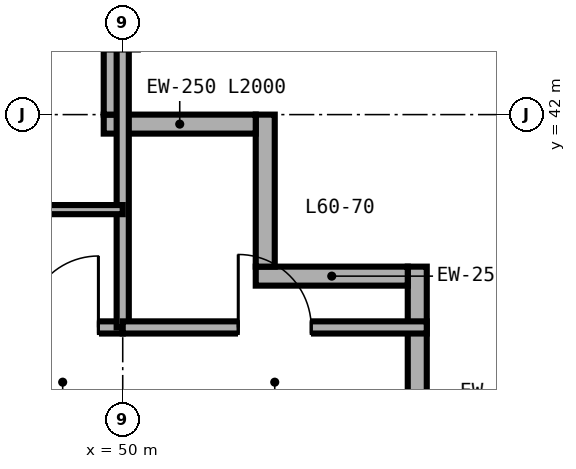
"""IFC4 building model, lengths in metres.
Left out: names, types, materials, properties, quantities, classifications, styles, units other than length and angle.
Written with IfcOpenShell. Run it as: python <this file> out.ifc"""

import sys

from ifc_helpers import new_model, si_unit, direction, frame, frame_2d, origin, place, context, subcontext, project, spatial, rectangle, extrude, source, transform, mapped, element, fill, save


model = new_model("IFC4")
c1 = context("Model", 3, precision=1e-05, world=origin(), true_north=direction((0.0, 1.0)))
c2 = subcontext(c1, "Body", "Model", "MODEL_VIEW")
j1 = project(units=[si_unit("LENGTHUNIT", "METRE"), si_unit("PLANEANGLEUNIT", "RADIAN")], contexts=[c1])
p1 = place(None, origin())
s1 = spatial("IfcSite", under=j1, at=p1, CompositionType="ELEMENT")
p2 = place(p1, origin())
s2 = spatial("IfcBuilding", under=s1, at=p2, CompositionType="ELEMENT")
p3 = place(p2, frame((0.0, 0.0, 240.0)))
s3 = spatial("IfcBuildingStorey", under=s2, at=p3, CompositionType="ELEMENT", Elevation=240.0)
for number, where, z_axis, x_axis in (
    (1, (53.875, 38.0, 0.0), (0.0, 0.0, 1.0), (0.0, 1.0, 0.0)),
    (2, (53.75, 39.875, 0.0), (0.0, 0.0, 1.0), (-1.0, 0.0, 0.0)),
    (3, (51.875, 40.0, 0.0), (0.0, 0.0, 1.0), (0.0, 1.0, 0.0)),
    (4, (51.75, 41.875, 0.0), (0.0, 0.0, 1.0), (-1.0, 0.0, 0.0)),
):
    element("IfcWall", number, at=place(p3, frame(where, z_axis=z_axis, x_axis=x_axis)), inside=s3, PredefinedType="SOLIDWALL", context=c2, shape_type="SweptSolid", body=[
        extrude(rectangle(XDim=2.0, YDim=0.25, at=frame_2d((1.0, 0.0))), origin(), (0.0, 0.0, 1.0), 3.38),
    ])
p4 = place(p3, frame((49.875, 42.0, 0.0), z_axis=(0.0, 0.0, 1.0), x_axis=(0.0, 1.0, 0.0)))
e5 = element("IfcWall", 5, at=p4, inside=s3, PredefinedType="SOLIDWALL", context=c2, shape_type="SweptSolid", body=[
    extrude(rectangle(XDim=2.0, YDim=0.25, at=frame_2d((1.0, 0.0))), origin(), (0.0, 0.0, 1.0), 2.687),
])
p5 = place(p3, frame((14.0, 39.2, 0.0), z_axis=(0.0, 0.0, 1.0), x_axis=(1.0, 0.0, 0.0)))
e6 = element("IfcWall", 6, at=p5, inside=s3, PredefinedType="PARTITIONING", context=c2, shape_type="SweptSolid", body=[
    extrude(rectangle(XDim=36.0, YDim=0.16, at=frame_2d((18.0, 0.0))), origin(), (0.0, 0.0, 1.0), 2.923),
])
p6 = place(p5, frame((3.24, 0.0, 0.0)))
e7 = element("IfcOpeningElement", 7, at=p6, cuts=e6, PredefinedType="OPENING", context=c2, shape_type="SweptSolid", body=[
    extrude(rectangle(XDim=0.94, YDim=2.15, at=frame_2d((0.47, 1.075))), frame((0.0, 0.09, 0.0), z_axis=(0.0, -1.0, 0.0), x_axis=(1.0, 0.0, 0.0)), (0.0, 0.0, 1.0), 0.18),
])
p7 = place(p5, frame((7.74, 0.0, 0.0)))
e8 = element("IfcOpeningElement", 8, at=p7, cuts=e6, PredefinedType="OPENING", context=c2, shape_type="SweptSolid", body=[
    extrude(rectangle(XDim=0.94, YDim=2.15, at=frame_2d((0.47, 1.075))), frame((0.0, 0.09, 0.0), z_axis=(0.0, -1.0, 0.0), x_axis=(1.0, 0.0, 0.0)), (0.0, 0.0, 1.0), 0.18),
])
p8 = place(p5, frame((12.24, 0.0, 0.0)))
e9 = element("IfcOpeningElement", 9, at=p8, cuts=e6, PredefinedType="OPENING", context=c2, shape_type="SweptSolid", body=[
    extrude(rectangle(XDim=0.94, YDim=2.15, at=frame_2d((0.47, 1.075))), frame((0.0, 0.09, 0.0), z_axis=(0.0, -1.0, 0.0), x_axis=(1.0, 0.0, 0.0)), (0.0, 0.0, 1.0), 0.18),
])
p9 = place(p5, frame((16.74, 0.0, 0.0)))
e10 = element("IfcOpeningElement", 10, at=p9, cuts=e6, PredefinedType="OPENING", context=c2, shape_type="SweptSolid", body=[
    extrude(rectangle(XDim=0.94, YDim=2.15, at=frame_2d((0.47, 1.075))), frame((0.0, 0.09, 0.0), z_axis=(0.0, -1.0, 0.0), x_axis=(1.0, 0.0, 0.0)), (0.0, 0.0, 1.0), 0.18),
])
p10 = place(p5, frame((21.24, 0.0, 0.0)))
e11 = element("IfcOpeningElement", 11, at=p10, cuts=e6, PredefinedType="OPENING", context=c2, shape_type="SweptSolid", body=[
    extrude(rectangle(XDim=0.94, YDim=2.15, at=frame_2d((0.47, 1.075))), frame((0.0, 0.09, 0.0), z_axis=(0.0, -1.0, 0.0), x_axis=(1.0, 0.0, 0.0)), (0.0, 0.0, 1.0), 0.18),
])
p11 = place(p5, frame((25.74, 0.0, 0.0)))
e12 = element("IfcOpeningElement", 12, at=p11, cuts=e6, PredefinedType="OPENING", context=c2, shape_type="SweptSolid", body=[
    extrude(rectangle(XDim=0.94, YDim=2.15, at=frame_2d((0.47, 1.075))), frame((0.0, 0.09, 0.0), z_axis=(0.0, -1.0, 0.0), x_axis=(1.0, 0.0, 0.0)), (0.0, 0.0, 1.0), 0.18),
])
p12 = place(p5, frame((30.24, 0.0, 0.0)))
e13 = element("IfcOpeningElement", 13, at=p12, cuts=e6, PredefinedType="OPENING", context=c2, shape_type="SweptSolid", body=[
    extrude(rectangle(XDim=0.94, YDim=2.15, at=frame_2d((0.47, 1.075))), frame((0.0, 0.09, 0.0), z_axis=(0.0, -1.0, 0.0), x_axis=(1.0, 0.0, 0.0)), (0.0, 0.0, 1.0), 0.18),
])
p13 = place(p5, frame((34.74, 0.0, 0.0)))
e14 = element("IfcOpeningElement", 14, at=p13, cuts=e6, PredefinedType="OPENING", context=c2, shape_type="SweptSolid", body=[
    extrude(rectangle(XDim=0.94, YDim=2.15, at=frame_2d((0.47, 1.075))), frame((0.0, 0.09, 0.0), z_axis=(0.0, -1.0, 0.0), x_axis=(1.0, 0.0, 0.0)), (0.0, 0.0, 1.0), 0.18),
])
p14 = place(p3, frame((50.0, 39.2, 0.0), z_axis=(0.0, 0.0, 1.0), x_axis=(0.0, 1.0, 0.0)))
e15 = element("IfcWall", 15, at=p14, inside=s3, PredefinedType="PARTITIONING", context=c2, shape_type="SweptSolid", body=[
    extrude(rectangle(XDim=4.44, YDim=0.16, at=frame_2d((2.22, 0.0))), origin(), (0.0, 0.0, 1.0), 2.687),
])
p15 = place(p3, frame((48.9, 40.75, 0.0), z_axis=(0.0, 0.0, 1.0), x_axis=(1.0, 0.0, 0.0)))
e16 = element("IfcWall", 16, at=p15, inside=s3, PredefinedType="PARTITIONING", context=c2, shape_type="SweptSolid", body=[
    extrude(rectangle(XDim=1.1, YDim=0.12, at=frame_2d((0.55, 0.0))), origin(), (0.0, 0.0, 1.0), 3.38),
])
p16 = place(p3, frame((50.0, 39.2, 0.0), z_axis=(0.0, 0.0, 1.0), x_axis=(1.0, 0.0, 0.0)))
e17 = element("IfcWall", 17, at=p16, inside=s3, PredefinedType="PARTITIONING", context=c2, shape_type="SweptSolid", body=[
    extrude(rectangle(XDim=4.0, YDim=0.16, at=frame_2d((2.0, 0.0))), origin(), (0.0, 0.0, 1.0), 3.38),
])
p17 = place(p16, frame((1.52, 0.0, 0.0)))
e18 = element("IfcOpeningElement", 18, at=p17, cuts=e17, PredefinedType="OPENING", context=c2, shape_type="SweptSolid", body=[
    extrude(rectangle(XDim=0.96, YDim=2.15, at=frame_2d((0.48, 1.075))), frame((0.0, 0.09, 0.0), z_axis=(0.0, -1.0, 0.0), x_axis=(1.0, 0.0, 0.0)), (0.0, 0.0, 1.0), 0.18),
])
m1 = source(origin(), c2, "Body", "SweptSolid", [
    extrude(rectangle(XDim=0.94, YDim=2.15, at=frame_2d((0.47, 1.075))), frame((0.0, 0.025, 0.0), z_axis=(0.0, -1.0, 0.0), x_axis=(1.0, 0.0, 0.0)), (0.0, 0.0, 1.0), 0.05),
])
p18 = place(p13, origin())
e19 = element("IfcDoor", 19, at=p18, inside=s3, OperationType="SINGLE_SWING_RIGHT", PredefinedType="DOOR", context=c2, shape_type="MappedRepresentation", body=[
    mapped(m1, transform((0.0, 0.0, 0.0), scale=1.0)),
])
fill(e14, e19)
m2 = source(origin(), c2, "Body", "SweptSolid", [
    extrude(rectangle(XDim=0.96, YDim=2.15, at=frame_2d((0.48, 1.075))), frame((0.0, 0.025, 0.0), z_axis=(0.0, -1.0, 0.0), x_axis=(1.0, 0.0, 0.0)), (0.0, 0.0, 1.0), 0.05),
])
p19 = place(p17, origin())
e20 = element("IfcDoor", 20, at=p19, inside=s3, OperationType="SINGLE_SWING_LEFT", PredefinedType="DOOR", context=c2, shape_type="MappedRepresentation", body=[
    mapped(m2, transform((0.0, 0.0, 0.0), scale=1.0)),
])
fill(e18, e20)
save(model, sys.argv[1])
